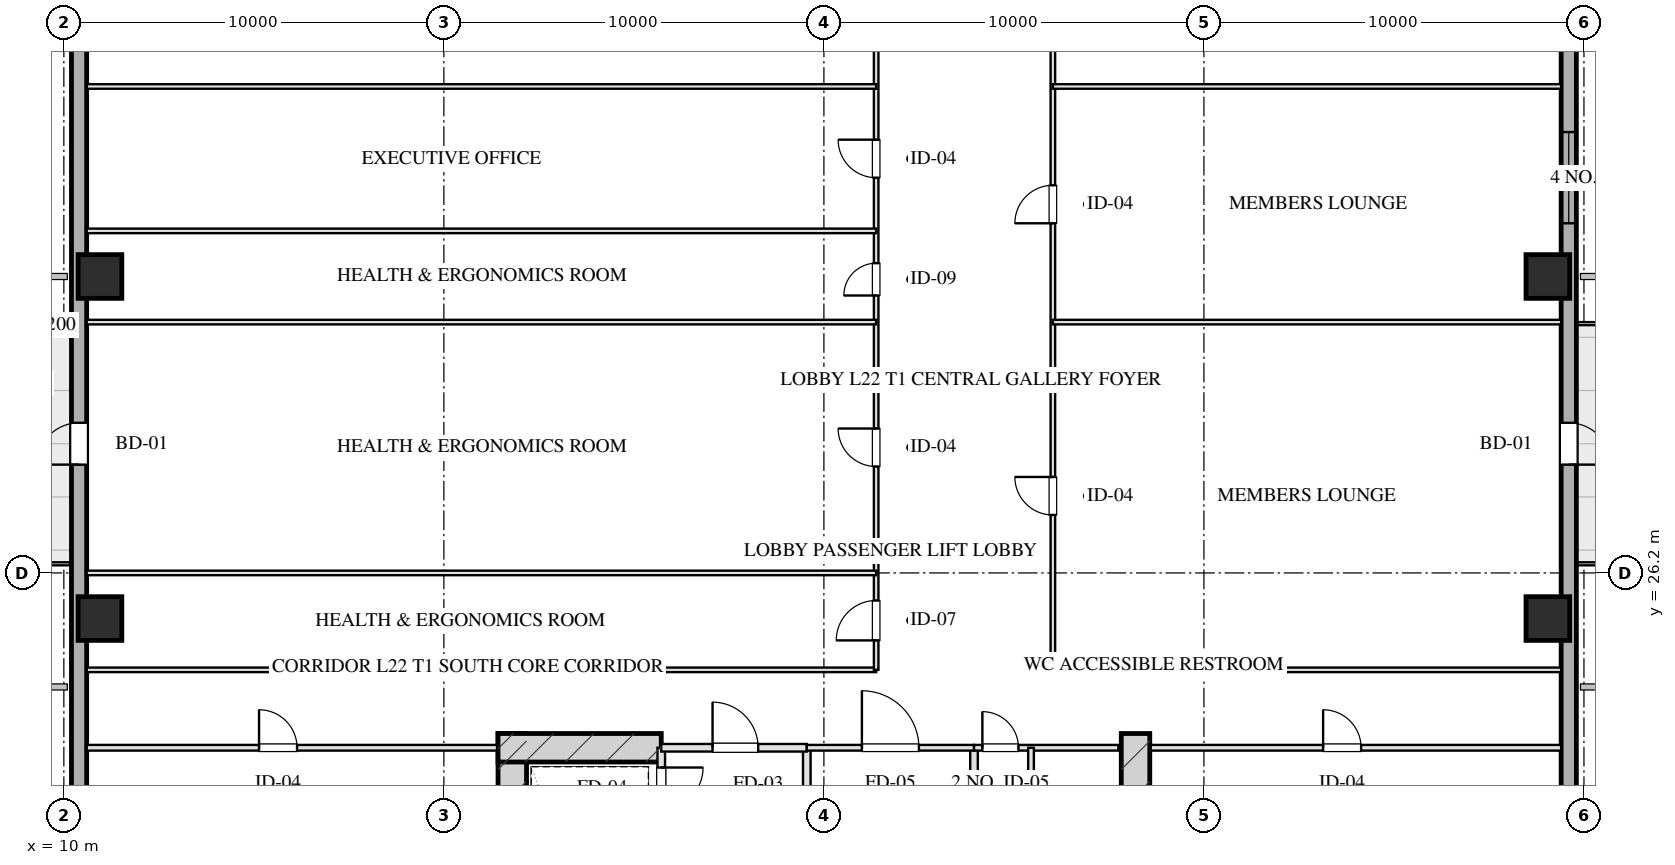
"""IFC4 building model, lengths in metres.
Left out: names, types, materials, properties, quantities, classifications, styles, units other than length and angle.
Written with IfcOpenShell. Run it as: python <this file> out.ifc"""

import sys

from ifc_helpers import new_model, si_unit, direction, frame, frame_2d, origin, origin_2d, place, context, subcontext, project, spatial, rectangle, hollow_rectangle, extrude, element, fill, save


model = new_model("IFC4")
c1 = context("Model", 3, precision=1e-05, world=origin(), true_north=direction((0.0, 1.0)))
c2 = subcontext(c1, "Body", "Model", "MODEL_VIEW")
j1 = project(units=[si_unit("LENGTHUNIT", "METRE"), si_unit("PLANEANGLEUNIT", "RADIAN")], contexts=[c1])
p1 = place(None, origin())
s1 = spatial("IfcSite", under=j1, at=p1, CompositionType="ELEMENT")
p2 = place(p1, origin())
s2 = spatial("IfcBuilding", under=s1, at=p2, CompositionType="ELEMENT")
p3 = place(p2, frame((0.0, 0.0, 88.55)))
s3 = spatial("IfcBuildingStorey", under=s2, at=p3, CompositionType="ELEMENT", Elevation=88.55)
for number, where, z_axis, x_axis in (
    (1, (21.8, 21.975, 0.0), (0.0, 0.0, 1.0), (0.0, -1.0, 0.0)),
    (2, (38.2, 21.975, 0.0), (0.0, 0.0, 1.0), (0.0, -1.0, 0.0)),
):
    element("IfcWall", number, at=place(p3, frame(where, z_axis=z_axis, x_axis=x_axis)), inside=s3, PredefinedType="SHEAR", context=c2, shape_type="SweptSolid", body=[
        extrude(rectangle(XDim=9.63, YDim=0.75, at=frame_2d((4.815, 0.0))), origin(), (0.0, 0.0, 1.0), 3.45),
    ])
p4 = place(p3, frame((21.425, 21.6, 0.0), z_axis=(0.0, 0.0, 1.0), x_axis=(1.0, 0.0, 0.0)))
e3 = element("IfcWall", 3, at=p4, inside=s3, PredefinedType="SHEAR", context=c2, shape_type="SweptSolid", body=[
    extrude(rectangle(XDim=4.295, YDim=0.75, at=frame_2d((2.147, 0.0))), origin(), (0.0, 0.0, 1.0), 3.45),
])
for number, where, z_axis, x_axis in (
    (4, (10.95, 25.0, 0.0), (0.0, 0.0, 1.0), (1.0, 0.0, 0.0)),
    (5, (10.95, 34.0, 0.0), (0.0, 0.0, 1.0), (1.0, 0.0, 0.0)),
    (6, (49.05, 25.0, 0.0), (0.0, 0.0, 1.0), (1.0, 0.0, 0.0)),
    (7, (49.05, 34.0, 0.0), (0.0, 0.0, 1.0), (1.0, 0.0, 0.0)),
):
    element("IfcColumn", number, at=place(p3, frame(where, z_axis=z_axis, x_axis=x_axis)), inside=s3, PredefinedType="COLUMN", context=c2, shape_type="SweptSolid", body=[
        extrude(hollow_rectangle(XDim=1.15, YDim=1.15, WallThickness=0.04, at=origin_2d()), origin(), (0.0, 0.0, 1.0), 3.451),
    ])
p5 = place(p3, frame((10.4, 7.2, 0.0), z_axis=(0.0, 0.0, 1.0), x_axis=(0.0, 1.0, 0.0)))
e8 = element("IfcWall", 8, at=p5, inside=s3, PredefinedType="SOLIDWALL", context=c2, shape_type="SweptSolid", body=[
    extrude(rectangle(XDim=53.6, YDim=0.4, at=frame_2d((26.8, 0.0))), origin(), (0.0, 0.0, 1.0), 2.55),
])
p6 = place(p5, frame((21.85, 0.0, 0.0)))
e9 = element("IfcOpeningElement", 9, at=p6, cuts=e8, PredefinedType="OPENING", context=c2, shape_type="SweptSolid", body=[
    extrude(rectangle(XDim=1.1, YDim=2.15, at=frame_2d((0.55, 1.075))), frame((0.0, 0.21, 0.0), z_axis=(0.0, -1.0, 0.0), x_axis=(1.0, 0.0, 0.0)), (0.0, 0.0, 1.0), 0.42),
])
p7 = place(p3, frame((49.6, 60.8, 0.0), z_axis=(0.0, 0.0, 1.0), x_axis=(0.0, -1.0, 0.0)))
e10 = element("IfcWall", 10, at=p7, inside=s3, PredefinedType="SOLIDWALL", context=c2, shape_type="SweptSolid", body=[
    extrude(rectangle(XDim=53.6, YDim=0.4, at=frame_2d((26.8, 0.0))), origin(), (0.0, 0.0, 1.0), 2.55),
])
p8 = place(p7, frame((23.0, 0.0, 0.75)))
e11 = element("IfcOpeningElement", 11, at=p8, cuts=e10, PredefinedType="OPENING", context=c2, shape_type="SweptSolid", body=[
    extrude(rectangle(XDim=2.4, YDim=1.4, at=frame_2d((1.2, 0.7))), frame((0.0, 0.21, 0.0), z_axis=(0.0, -1.0, 0.0), x_axis=(1.0, 0.0, 0.0)), (0.0, 0.0, 1.0), 0.42),
])
p9 = place(p7, frame((30.65, 0.0, 0.0)))
e12 = element("IfcOpeningElement", 12, at=p9, cuts=e10, PredefinedType="OPENING", context=c2, shape_type="SweptSolid", body=[
    extrude(rectangle(XDim=1.1, YDim=2.15, at=frame_2d((0.55, 1.075))), frame((0.0, 0.21, 0.0), z_axis=(0.0, -1.0, 0.0), x_axis=(1.0, 0.0, 0.0)), (0.0, 0.0, 1.0), 0.42),
])
p10 = place(p3, frame((25.72, 21.6, 0.0), z_axis=(0.0, 0.0, 1.0), x_axis=(0.0, -1.0, 0.0)))
e13 = element("IfcWall", 13, at=p10, inside=s3, PredefinedType="PARTITIONING", context=c2, shape_type="SweptSolid", body=[
    extrude(rectangle(XDim=1.9, YDim=0.2, at=frame_2d((0.95, 0.0))), origin(), (0.0, 0.0, 1.0), 3.155),
])
p11 = place(p10, frame((0.52, 0.0, 0.0)))
e14 = element("IfcOpeningElement", 14, at=p11, cuts=e13, PredefinedType="OPENING", context=c2, shape_type="SweptSolid", body=[
    extrude(rectangle(XDim=1.1, YDim=2.05, at=frame_2d((0.55, 1.025))), frame((0.0, 0.11, 0.0), z_axis=(0.0, -1.0, 0.0), x_axis=(1.0, 0.0, 0.0)), (0.0, 0.0, 1.0), 0.22),
])
p12 = place(p3, frame((29.55, 21.6, 0.0), z_axis=(0.0, 0.0, 1.0), x_axis=(0.0, -1.0, 0.0)))
e15 = element("IfcWall", 15, at=p12, inside=s3, PredefinedType="PARTITIONING", context=c2, shape_type="SweptSolid", body=[
    extrude(rectangle(XDim=8.43, YDim=0.2, at=frame_2d((4.215, 0.0))), origin(), (0.0, 0.0, 1.0), 3.155),
])
p13 = place(p3, frame((25.72, 21.6, 0.0), z_axis=(0.0, 0.0, 1.0), x_axis=(1.0, 0.0, 0.0)))
e16 = element("IfcWall", 16, at=p13, inside=s3, PredefinedType="PARTITIONING", context=c2, shape_type="SweptSolid", body=[
    extrude(rectangle(XDim=3.83, YDim=0.2, at=frame_2d((1.915, 0.0))), origin(), (0.0, 0.0, 1.0), 3.155),
])
p14 = place(p13, frame((1.35, 0.0, 0.0)))
e17 = element("IfcOpeningElement", 17, at=p14, cuts=e16, PredefinedType="OPENING", context=c2, shape_type="SweptSolid", body=[
    extrude(rectangle(XDim=1.2, YDim=2.05, at=frame_2d((0.6, 1.025))), frame((0.0, 0.11, 0.0), z_axis=(0.0, -1.0, 0.0), x_axis=(1.0, 0.0, 0.0)), (0.0, 0.0, 1.0), 0.22),
])
p15 = place(p3, frame((33.95, 21.6, 0.0), z_axis=(0.0, 0.0, 1.0), x_axis=(0.0, -1.0, 0.0)))
e18 = element("IfcWall", 18, at=p15, inside=s3, PredefinedType="PARTITIONING", context=c2, shape_type="SweptSolid", body=[
    extrude(rectangle(XDim=8.43, YDim=0.2, at=frame_2d((4.215, 0.0))), origin(), (0.0, 0.0, 1.0), 3.155),
])
p16 = place(p3, frame((29.55, 21.6, 0.0), z_axis=(0.0, 0.0, 1.0), x_axis=(1.0, 0.0, 0.0)))
e19 = element("IfcWall", 19, at=p16, inside=s3, PredefinedType="PARTITIONING", context=c2, shape_type="SweptSolid", body=[
    extrude(rectangle(XDim=4.4, YDim=0.15, at=frame_2d((2.2, 0.0))), origin(), (0.0, 0.0, 1.0), 3.155),
])
p17 = place(p16, frame((1.45, 0.0, 0.0)))
e20 = element("IfcOpeningElement", 20, at=p17, cuts=e19, PredefinedType="OPENING", context=c2, shape_type="SweptSolid", body=[
    extrude(rectangle(XDim=1.5, YDim=2.05, at=frame_2d((0.75, 1.025))), frame((0.0, 0.085, 0.0), z_axis=(0.0, -1.0, 0.0), x_axis=(1.0, 0.0, 0.0)), (0.0, 0.0, 1.0), 0.17),
])
p18 = place(p3, frame((33.95, 21.6, 0.0), z_axis=(0.0, 0.0, 1.0), x_axis=(1.0, 0.0, 0.0)))
e21 = element("IfcWall", 21, at=p18, inside=s3, PredefinedType="PARTITIONING", context=c2, shape_type="SweptSolid", body=[
    extrude(rectangle(XDim=3.8, YDim=0.15, at=frame_2d((1.9, 0.0))), origin(), (0.0, 0.0, 1.0), 3.155),
])
p19 = place(p18, frame((0.22, 0.0, 0.0)))
e22 = element("IfcOpeningElement", 22, at=p19, cuts=e21, PredefinedType="OPENING", context=c2, shape_type="SweptSolid", body=[
    extrude(rectangle(XDim=0.95, YDim=2.05, at=frame_2d((0.475, 1.025))), frame((0.0, 0.085, 0.0), z_axis=(0.0, -1.0, 0.0), x_axis=(1.0, 0.0, 0.0)), (0.0, 0.0, 1.0), 0.17),
])
p20 = place(p3, frame((35.45, 21.6, 0.0), z_axis=(0.0, 0.0, 1.0), x_axis=(0.0, -1.0, 0.0)))
e23 = element("IfcWall", 23, at=p20, inside=s3, PredefinedType="PARTITIONING", context=c2, shape_type="SweptSolid", body=[
    extrude(rectangle(XDim=8.43, YDim=0.15, at=frame_2d((4.215, 0.0))), origin(), (0.0, 0.0, 1.0), 2.745),
])
p21 = place(p20, frame((2.55, 0.0, 0.0)))
e24 = element("IfcOpeningElement", 24, at=p21, cuts=e23, PredefinedType="OPENING", context=c2, shape_type="SweptSolid", body=[
    extrude(rectangle(XDim=0.95, YDim=2.05, at=frame_2d((0.475, 1.025))), frame((0.0, 0.085, 0.0), z_axis=(0.0, -1.0, 0.0), x_axis=(1.0, 0.0, 0.0)), (0.0, 0.0, 1.0), 0.17),
])
p22 = place(p20, frame((5.8, 0.0, 0.0)))
e25 = element("IfcOpeningElement", 25, at=p22, cuts=e23, PredefinedType="OPENING", context=c2, shape_type="SweptSolid", body=[
    extrude(rectangle(XDim=0.9, YDim=2.05, at=frame_2d((0.45, 1.025))), frame((0.0, 0.085, 0.0), z_axis=(0.0, -1.0, 0.0), x_axis=(1.0, 0.0, 0.0)), (0.0, 0.0, 1.0), 0.17),
])
p23 = place(p3, frame((10.6, 21.6, 0.0), z_axis=(0.0, 0.0, 1.0), x_axis=(1.0, 0.0, 0.0)))
e26 = element("IfcWall", 26, at=p23, inside=s3, PredefinedType="PARTITIONING", context=c2, shape_type="SweptSolid", body=[
    extrude(rectangle(XDim=10.8, YDim=0.15, at=frame_2d((5.4, 0.0))), origin(), (0.0, 0.0, 1.0), 2.15),
])
p24 = place(p23, frame((4.536, 0.0, 0.0)))
e27 = element("IfcOpeningElement", 27, at=p24, cuts=e26, PredefinedType="OPENING", context=c2, shape_type="SweptSolid", body=[
    extrude(rectangle(XDim=1.0, YDim=2.05, at=frame_2d((0.5, 1.025))), frame((0.0, 0.085, 0.0), z_axis=(0.0, -1.0, 0.0), x_axis=(1.0, 0.0, 0.0)), (0.0, 0.0, 1.0), 0.17),
])
p25 = place(p3, frame((38.6, 21.6, 0.0), z_axis=(0.0, 0.0, 1.0), x_axis=(1.0, 0.0, 0.0)))
e28 = element("IfcWall", 28, at=p25, inside=s3, PredefinedType="PARTITIONING", context=c2, shape_type="SweptSolid", body=[
    extrude(rectangle(XDim=10.8, YDim=0.15, at=frame_2d((5.4, 0.0))), origin(), (0.0, 0.0, 1.0), 2.15),
])
p26 = place(p25, frame((4.536, 0.0, 0.0)))
e29 = element("IfcOpeningElement", 29, at=p26, cuts=e28, PredefinedType="OPENING", context=c2, shape_type="SweptSolid", body=[
    extrude(rectangle(XDim=1.0, YDim=2.05, at=frame_2d((0.5, 1.025))), frame((0.0, 0.085, 0.0), z_axis=(0.0, -1.0, 0.0), x_axis=(1.0, 0.0, 0.0)), (0.0, 0.0, 1.0), 0.17),
])
p27 = place(p3, frame((10.6, 23.65, 0.0), z_axis=(0.0, 0.0, 1.0), x_axis=(1.0, 0.0, 0.0)))
e30 = element("IfcWall", 30, at=p27, inside=s3, PredefinedType="PARTITIONING", context=c2, shape_type="SweptSolid", body=[
    extrude(rectangle(XDim=20.775, YDim=0.12, at=frame_2d((10.387, 0.0))), origin(), (0.0, 0.0, 1.0), 2.15),
])
p28 = place(p3, frame((36.025, 23.65, 0.0), z_axis=(0.0, 0.0, 1.0), x_axis=(1.0, 0.0, 0.0)))
e31 = element("IfcWall", 31, at=p28, inside=s3, PredefinedType="PARTITIONING", context=c2, shape_type="SweptSolid", body=[
    extrude(rectangle(XDim=13.375, YDim=0.12, at=frame_2d((6.688, 0.0))), origin(), (0.0, 0.0, 1.0), 2.15),
])
p29 = place(p3, frame((31.375, 23.65, 0.0), z_axis=(0.0, 0.0, 1.0), x_axis=(0.0, 1.0, 0.0)))
e32 = element("IfcWall", 32, at=p29, inside=s3, PredefinedType="PARTITIONING", context=c2, shape_type="SweptSolid", body=[
    extrude(rectangle(XDim=20.7, YDim=0.12, at=frame_2d((10.35, 0.0))), origin(), (0.0, 0.0, 1.0), 3.155),
])
p30 = place(p29, frame((0.775, 0.0, 0.0)))
e33 = element("IfcOpeningElement", 33, at=p30, cuts=e32, PredefinedType="OPENING", context=c2, shape_type="SweptSolid", body=[
    extrude(rectangle(XDim=1.05, YDim=2.05, at=frame_2d((0.525, 1.025))), frame((0.0, 0.07, 0.0), z_axis=(0.0, -1.0, 0.0), x_axis=(1.0, 0.0, 0.0)), (0.0, 0.0, 1.0), 0.14),
])
p31 = place(p29, frame((5.35, 0.0, 0.0)))
e34 = element("IfcOpeningElement", 34, at=p31, cuts=e32, PredefinedType="OPENING", context=c2, shape_type="SweptSolid", body=[
    extrude(rectangle(XDim=1.0, YDim=2.05, at=frame_2d((0.5, 1.025))), frame((0.0, 0.07, 0.0), z_axis=(0.0, -1.0, 0.0), x_axis=(1.0, 0.0, 0.0)), (0.0, 0.0, 1.0), 0.14),
])
p32 = place(p29, frame((9.85, 0.0, 0.0)))
e35 = element("IfcOpeningElement", 35, at=p32, cuts=e32, PredefinedType="OPENING", context=c2, shape_type="SweptSolid", body=[
    extrude(rectangle(XDim=0.85, YDim=2.05, at=frame_2d((0.425, 1.025))), frame((0.0, 0.07, 0.0), z_axis=(0.0, -1.0, 0.0), x_axis=(1.0, 0.0, 0.0)), (0.0, 0.0, 1.0), 0.14),
])
p33 = place(p29, frame((12.95, 0.0, 0.0)))
e36 = element("IfcOpeningElement", 36, at=p33, cuts=e32, PredefinedType="OPENING", context=c2, shape_type="SweptSolid", body=[
    extrude(rectangle(XDim=1.0, YDim=2.05, at=frame_2d((0.5, 1.025))), frame((0.0, 0.07, 0.0), z_axis=(0.0, -1.0, 0.0), x_axis=(1.0, 0.0, 0.0)), (0.0, 0.0, 1.0), 0.14),
])
p34 = place(p29, frame((17.525, 0.0, 0.0)))
e37 = element("IfcOpeningElement", 37, at=p34, cuts=e32, PredefinedType="OPENING", context=c2, shape_type="SweptSolid", body=[
    extrude(rectangle(XDim=1.0, YDim=2.05, at=frame_2d((0.5, 1.025))), frame((0.0, 0.07, 0.0), z_axis=(0.0, -1.0, 0.0), x_axis=(1.0, 0.0, 0.0)), (0.0, 0.0, 1.0), 0.14),
])
p35 = place(p3, frame((36.025, 23.65, 0.0), z_axis=(0.0, 0.0, 1.0), x_axis=(0.0, 1.0, 0.0)))
e38 = element("IfcWall", 38, at=p35, inside=s3, PredefinedType="PARTITIONING", context=c2, shape_type="SweptSolid", body=[
    extrude(rectangle(XDim=20.7, YDim=0.12, at=frame_2d((10.35, 0.0))), origin(), (0.0, 0.0, 1.0), 3.155),
])
p36 = place(p35, frame((4.075, 0.0, 0.0)))
e39 = element("IfcOpeningElement", 39, at=p36, cuts=e38, PredefinedType="OPENING", context=c2, shape_type="SweptSolid", body=[
    extrude(rectangle(XDim=1.0, YDim=2.05, at=frame_2d((0.5, 1.025))), frame((0.0, 0.07, 0.0), z_axis=(0.0, -1.0, 0.0), x_axis=(1.0, 0.0, 0.0)), (0.0, 0.0, 1.0), 0.14),
])
p37 = place(p35, frame((11.75, 0.0, 0.0)))
e40 = element("IfcOpeningElement", 40, at=p37, cuts=e38, PredefinedType="OPENING", context=c2, shape_type="SweptSolid", body=[
    extrude(rectangle(XDim=1.0, YDim=2.05, at=frame_2d((0.5, 1.025))), frame((0.0, 0.07, 0.0), z_axis=(0.0, -1.0, 0.0), x_axis=(1.0, 0.0, 0.0)), (0.0, 0.0, 1.0), 0.14),
])
p38 = place(p35, frame((17.525, 0.0, 0.0)))
e41 = element("IfcOpeningElement", 41, at=p38, cuts=e38, PredefinedType="OPENING", context=c2, shape_type="SweptSolid", body=[
    extrude(rectangle(XDim=1.05, YDim=2.05, at=frame_2d((0.525, 1.025))), frame((0.0, 0.07, 0.0), z_axis=(0.0, -1.0, 0.0), x_axis=(1.0, 0.0, 0.0)), (0.0, 0.0, 1.0), 0.14),
])
for number, where, z_axis, x_axis in (
    (42, (10.6, 26.2, 0.0), (0.0, 0.0, 1.0), (1.0, 0.0, 0.0)),
    (43, (10.6, 32.8, 0.0), (0.0, 0.0, 1.0), (1.0, 0.0, 0.0)),
    (44, (10.6, 35.2, 0.0), (0.0, 0.0, 1.0), (1.0, 0.0, 0.0)),
    (45, (10.6, 39.0, 0.0), (0.0, 0.0, 1.0), (1.0, 0.0, 0.0)),
):
    element("IfcWall", number, at=place(p3, frame(where, z_axis=z_axis, x_axis=x_axis)), inside=s3, PredefinedType="PARTITIONING", context=c2, shape_type="SweptSolid", body=[
        extrude(rectangle(XDim=20.775, YDim=0.12, at=frame_2d((10.387, 0.0))), origin(), (0.0, 0.0, 1.0), 3.155),
    ])
for number, where, z_axis, x_axis in (
    (46, (36.025, 32.8, 0.0), (0.0, 0.0, 1.0), (1.0, 0.0, 0.0)),
    (47, (36.025, 39.0, 0.0), (0.0, 0.0, 1.0), (1.0, 0.0, 0.0)),
):
    element("IfcWall", number, at=place(p3, frame(where, z_axis=z_axis, x_axis=x_axis)), inside=s3, PredefinedType="PARTITIONING", context=c2, shape_type="SweptSolid", body=[
        extrude(rectangle(XDim=13.375, YDim=0.12, at=frame_2d((6.688, 0.0))), origin(), (0.0, 0.0, 1.0), 3.155),
    ])
p39 = place(p8, origin())
e48 = element("IfcWindow", 48, at=p39, inside=s3, PartitioningType="TRIPLE_PANEL_VERTICAL", PredefinedType="WINDOW", context=c2, shape_type="SweptSolid", body=[
    extrude(rectangle(XDim=2.4, YDim=1.4, at=frame_2d((1.2, 0.7))), frame((0.0, 0.03, 0.0), z_axis=(0.0, -1.0, 0.0), x_axis=(1.0, 0.0, 0.0)), (0.0, 0.0, 1.0), 0.06),
])
fill(e11, e48)
p40 = place(p6, origin())
e49 = element("IfcDoor", 49, at=p40, inside=s3, OperationType="SINGLE_SWING_LEFT", PredefinedType="DOOR", context=c2, shape_type="SweptSolid", body=[
    extrude(rectangle(XDim=1.1, YDim=2.15, at=frame_2d((0.55, 1.075))), frame((0.0, 0.025, 0.0), z_axis=(0.0, -1.0, 0.0), x_axis=(1.0, 0.0, 0.0)), (0.0, 0.0, 1.0), 0.05),
])
fill(e9, e49)
p41 = place(p9, origin())
e50 = element("IfcDoor", 50, at=p41, inside=s3, OperationType="SINGLE_SWING_RIGHT", PredefinedType="DOOR", context=c2, shape_type="SweptSolid", body=[
    extrude(rectangle(XDim=1.1, YDim=2.15, at=frame_2d((0.55, 1.075))), frame((0.0, 0.025, 0.0), z_axis=(0.0, -1.0, 0.0), x_axis=(1.0, 0.0, 0.0)), (0.0, 0.0, 1.0), 0.05),
])
fill(e12, e50)
p42 = place(p11, origin())
e51 = element("IfcDoor", 51, at=p42, inside=s3, OperationType="SINGLE_SWING_LEFT", PredefinedType="DOOR", context=c2, shape_type="SweptSolid", body=[
    extrude(rectangle(XDim=1.1, YDim=2.05, at=frame_2d((0.55, 1.025))), frame((0.0, 0.025, 0.0), z_axis=(0.0, -1.0, 0.0), x_axis=(1.0, 0.0, 0.0)), (0.0, 0.0, 1.0), 0.05),
])
fill(e14, e51)
p43 = place(p14, origin())
e52 = element("IfcDoor", 52, at=p43, inside=s3, OperationType="SINGLE_SWING_LEFT", PredefinedType="DOOR", context=c2, shape_type="SweptSolid", body=[
    extrude(rectangle(XDim=1.2, YDim=2.05, at=frame_2d((0.6, 1.025))), frame((0.0, 0.025, 0.0), z_axis=(0.0, -1.0, 0.0), x_axis=(1.0, 0.0, 0.0)), (0.0, 0.0, 1.0), 0.05),
])
fill(e17, e52)
p44 = place(p17, origin())
e53 = element("IfcDoor", 53, at=p44, inside=s3, OperationType="SINGLE_SWING_LEFT", PredefinedType="DOOR", context=c2, shape_type="SweptSolid", body=[
    extrude(rectangle(XDim=1.5, YDim=2.05, at=frame_2d((0.75, 1.025))), frame((0.0, 0.025, 0.0), z_axis=(0.0, -1.0, 0.0), x_axis=(1.0, 0.0, 0.0)), (0.0, 0.0, 1.0), 0.05),
])
fill(e20, e53)
p45 = place(p19, origin())
e54 = element("IfcDoor", 54, at=p45, inside=s3, OperationType="SINGLE_SWING_LEFT", PredefinedType="DOOR", context=c2, shape_type="SweptSolid", body=[
    extrude(rectangle(XDim=0.95, YDim=2.05, at=frame_2d((0.475, 1.025))), frame((0.0, 0.025, 0.0), z_axis=(0.0, -1.0, 0.0), x_axis=(1.0, 0.0, 0.0)), (0.0, 0.0, 1.0), 0.05),
])
fill(e22, e54)
p46 = place(p24, origin())
e55 = element("IfcDoor", 55, at=p46, inside=s3, OperationType="SINGLE_SWING_LEFT", PredefinedType="DOOR", context=c2, shape_type="SweptSolid", body=[
    extrude(rectangle(XDim=1.0, YDim=2.05, at=frame_2d((0.5, 1.025))), frame((0.0, 0.025, 0.0), z_axis=(0.0, -1.0, 0.0), x_axis=(1.0, 0.0, 0.0)), (0.0, 0.0, 1.0), 0.05),
])
fill(e27, e55)
p47 = place(p26, origin())
e56 = element("IfcDoor", 56, at=p47, inside=s3, OperationType="SINGLE_SWING_LEFT", PredefinedType="DOOR", context=c2, shape_type="SweptSolid", body=[
    extrude(rectangle(XDim=1.0, YDim=2.05, at=frame_2d((0.5, 1.025))), frame((0.0, 0.025, 0.0), z_axis=(0.0, -1.0, 0.0), x_axis=(1.0, 0.0, 0.0)), (0.0, 0.0, 1.0), 0.05),
])
fill(e29, e56)
p48 = place(p30, origin())
e57 = element("IfcDoor", 57, at=p48, inside=s3, OperationType="SINGLE_SWING_LEFT", PredefinedType="DOOR", context=c2, shape_type="SweptSolid", body=[
    extrude(rectangle(XDim=1.05, YDim=2.05, at=frame_2d((0.525, 1.025))), frame((0.0, 0.025, 0.0), z_axis=(0.0, -1.0, 0.0), x_axis=(1.0, 0.0, 0.0)), (0.0, 0.0, 1.0), 0.05),
])
fill(e33, e57)
p49 = place(p31, origin())
e58 = element("IfcDoor", 58, at=p49, inside=s3, OperationType="SINGLE_SWING_RIGHT", PredefinedType="DOOR", context=c2, shape_type="SweptSolid", body=[
    extrude(rectangle(XDim=1.0, YDim=2.05, at=frame_2d((0.5, 1.025))), frame((0.0, 0.025, 0.0), z_axis=(0.0, -1.0, 0.0), x_axis=(1.0, 0.0, 0.0)), (0.0, 0.0, 1.0), 0.05),
])
fill(e34, e58)
p50 = place(p32, origin())
e59 = element("IfcDoor", 59, at=p50, inside=s3, OperationType="SINGLE_SWING_LEFT", PredefinedType="DOOR", context=c2, shape_type="SweptSolid", body=[
    extrude(rectangle(XDim=0.85, YDim=2.05, at=frame_2d((0.425, 1.025))), frame((0.0, 0.025, 0.0), z_axis=(0.0, -1.0, 0.0), x_axis=(1.0, 0.0, 0.0)), (0.0, 0.0, 1.0), 0.05),
])
fill(e35, e59)
p51 = place(p33, origin())
e60 = element("IfcDoor", 60, at=p51, inside=s3, OperationType="SINGLE_SWING_RIGHT", PredefinedType="DOOR", context=c2, shape_type="SweptSolid", body=[
    extrude(rectangle(XDim=1.0, YDim=2.05, at=frame_2d((0.5, 1.025))), frame((0.0, 0.025, 0.0), z_axis=(0.0, -1.0, 0.0), x_axis=(1.0, 0.0, 0.0)), (0.0, 0.0, 1.0), 0.05),
])
fill(e36, e60)
p52 = place(p36, origin())
e61 = element("IfcDoor", 61, at=p52, inside=s3, OperationType="SINGLE_SWING_RIGHT", PredefinedType="DOOR", context=c2, shape_type="SweptSolid", body=[
    extrude(rectangle(XDim=1.0, YDim=2.05, at=frame_2d((0.5, 1.025))), frame((0.0, 0.025, 0.0), z_axis=(0.0, -1.0, 0.0), x_axis=(1.0, 0.0, 0.0)), (0.0, 0.0, 1.0), 0.05),
])
fill(e39, e61)
p53 = place(p37, origin())
e62 = element("IfcDoor", 62, at=p53, inside=s3, OperationType="SINGLE_SWING_LEFT", PredefinedType="DOOR", context=c2, shape_type="SweptSolid", body=[
    extrude(rectangle(XDim=1.0, YDim=2.05, at=frame_2d((0.5, 1.025))), frame((0.0, 0.025, 0.0), z_axis=(0.0, -1.0, 0.0), x_axis=(1.0, 0.0, 0.0)), (0.0, 0.0, 1.0), 0.05),
])
fill(e40, e62)
save(model, sys.argv[1])
